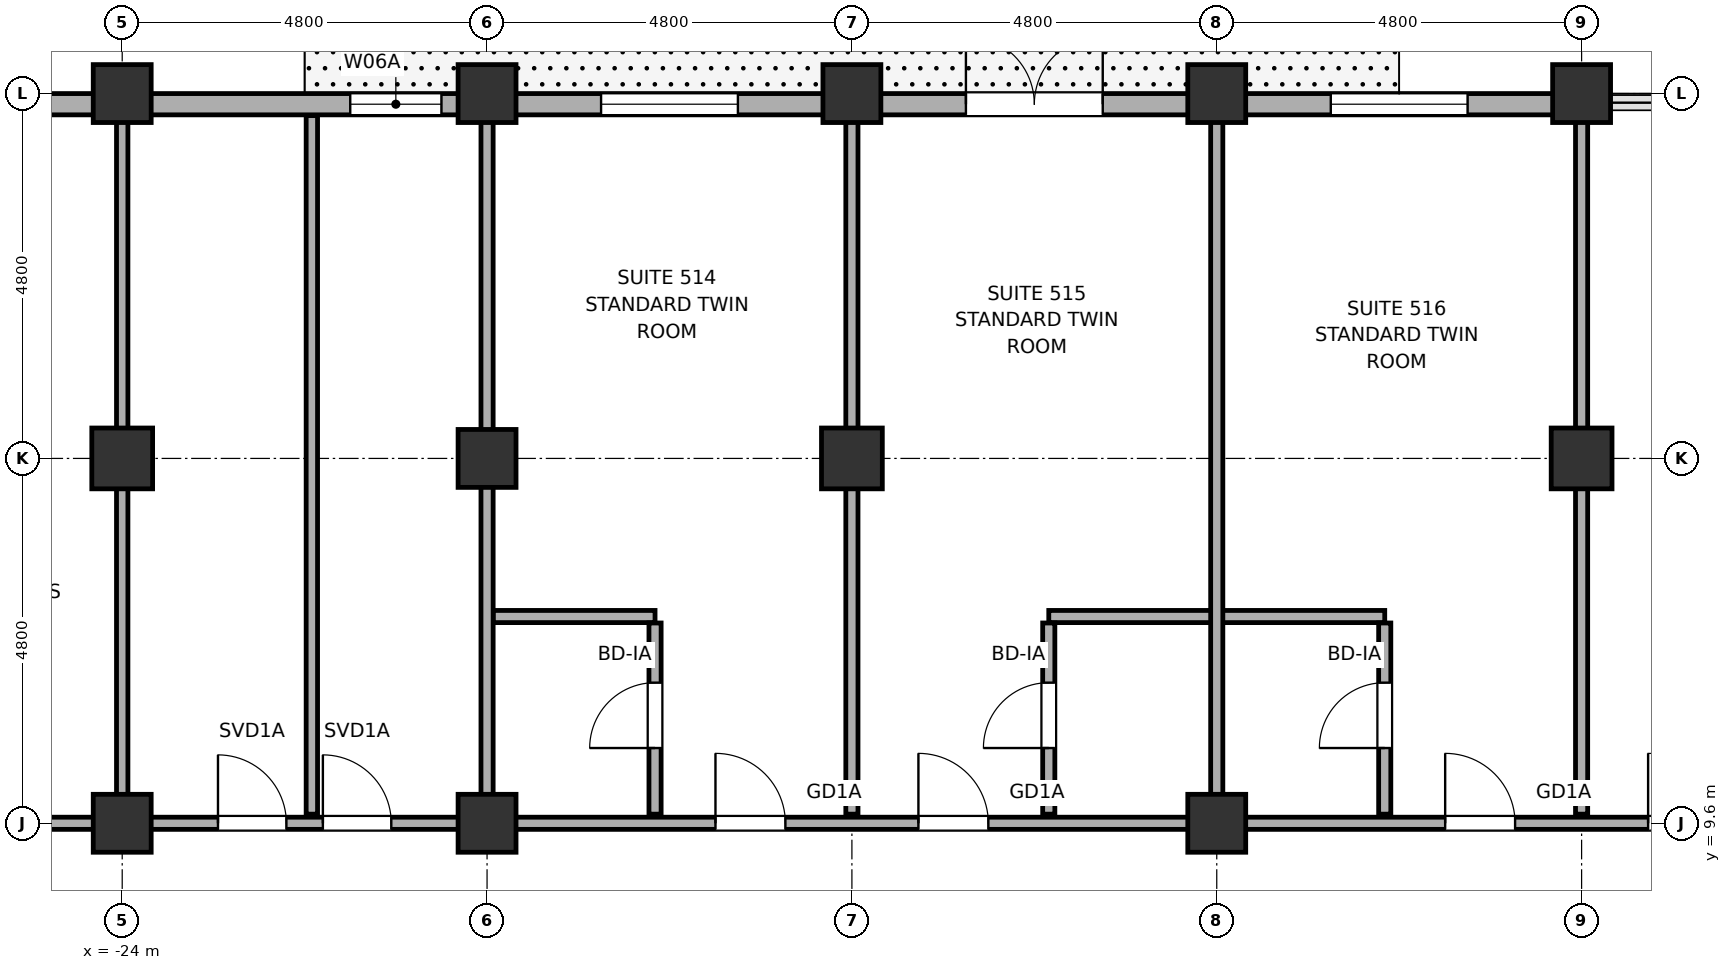
"""IFC4 building model, lengths in metres.
Left out: names, types, materials, properties, quantities, classifications, styles, units other than length and angle.
Written with IfcOpenShell. Run it as: python <this file> out.ifc"""

import sys

from ifc_helpers import new_model, si_unit, direction, frame, frame_2d, origin, origin_2d, place, context, subcontext, project, spatial, rectangle, hollow_rectangle, hollow_circle, extrude, element, fill, save


model = new_model("IFC4")
c1 = context("Model", 3, precision=1e-05, world=origin(), true_north=direction((0.0, 1.0)))
c2 = subcontext(c1, "Body", "Model", "MODEL_VIEW")
j1 = project(units=[si_unit("LENGTHUNIT", "METRE"), si_unit("PLANEANGLEUNIT", "RADIAN")], contexts=[c1])
p1 = place(None, origin())
s1 = spatial("IfcSite", under=j1, at=p1, CompositionType="ELEMENT")
p2 = place(p1, origin())
s2 = spatial("IfcBuilding", under=s1, at=p2, CompositionType="ELEMENT")
p3 = place(p2, frame((0.0, 0.0, 30.0)))
s3 = spatial("IfcBuildingStorey", under=s2, at=p3, CompositionType="ELEMENT", Elevation=30.0)
p4 = place(p3, frame((-24.0, 9.6, 0.0), z_axis=(0.0, 0.0, 1.0), x_axis=(1.0, 0.0, 0.0)))
e1 = element("IfcColumn", 1, at=p4, inside=s3, PredefinedType="COLUMN", context=c2, shape_type="SweptSolid", body=[
    extrude(hollow_circle(Radius=0.381, WallThickness=0.032, at=origin_2d()), origin(), (0.0, 0.0, 1.0), 3.7),
])
p5 = place(p3, frame((-24.0, 14.4, 0.0), z_axis=(0.0, 0.0, 1.0), x_axis=(1.0, 0.0, 0.0)))
e2 = element("IfcColumn", 2, at=p5, inside=s3, PredefinedType="COLUMN", context=c2, shape_type="SweptSolid", body=[
    extrude(hollow_rectangle(XDim=0.8, YDim=0.8, WallThickness=0.036, at=origin_2d()), origin(), (0.0, 0.0, 1.0), 3.7),
])
for number, where, z_axis, x_axis in (
    (3, (-24.0, 19.2, 0.0), (0.0, 0.0, 1.0), (1.0, 0.0, 0.0)),
    (4, (-19.2, 9.6, 0.0), (0.0, 0.0, 1.0), (1.0, 0.0, 0.0)),
    (5, (-19.2, 14.4, 0.0), (0.0, 0.0, 1.0), (1.0, 0.0, 0.0)),
    (6, (-19.2, 19.2, 0.0), (0.0, 0.0, 1.0), (1.0, 0.0, 0.0)),
):
    element("IfcColumn", number, at=place(p3, frame(where, z_axis=z_axis, x_axis=x_axis)), inside=s3, PredefinedType="COLUMN", context=c2, shape_type="SweptSolid", body=[
        extrude(hollow_circle(Radius=0.381, WallThickness=0.032, at=origin_2d()), origin(), (0.0, 0.0, 1.0), 3.7),
    ])
p6 = place(p3, frame((-14.4, 14.4, 0.0), z_axis=(0.0, 0.0, 1.0), x_axis=(1.0, 0.0, 0.0)))
e7 = element("IfcColumn", 7, at=p6, inside=s3, PredefinedType="COLUMN", context=c2, shape_type="SweptSolid", body=[
    extrude(hollow_rectangle(XDim=0.8, YDim=0.8, WallThickness=0.036, at=origin_2d()), origin(), (0.0, 0.0, 1.0), 3.7),
])
for number, where, z_axis, x_axis in (
    (8, (-14.4, 19.2, 0.0), (0.0, 0.0, 1.0), (1.0, 0.0, 0.0)),
    (9, (-9.6, 9.6, 0.0), (0.0, 0.0, 1.0), (1.0, 0.0, 0.0)),
    (10, (-9.6, 19.2, 0.0), (0.0, 0.0, 1.0), (1.0, 0.0, 0.0)),
):
    element("IfcColumn", number, at=place(p3, frame(where, z_axis=z_axis, x_axis=x_axis)), inside=s3, PredefinedType="COLUMN", context=c2, shape_type="SweptSolid", body=[
        extrude(hollow_circle(Radius=0.381, WallThickness=0.032, at=origin_2d()), origin(), (0.0, 0.0, 1.0), 3.7),
    ])
p7 = place(p3, frame((-4.8, 14.4, 0.0), z_axis=(0.0, 0.0, 1.0), x_axis=(1.0, 0.0, 0.0)))
e11 = element("IfcColumn", 11, at=p7, inside=s3, PredefinedType="COLUMN", context=c2, shape_type="SweptSolid", body=[
    extrude(hollow_rectangle(XDim=0.8, YDim=0.8, WallThickness=0.036, at=origin_2d()), origin(), (0.0, 0.0, 1.0), 3.7),
])
p8 = place(p3, frame((-4.8, 19.2, 0.0), z_axis=(0.0, 0.0, 1.0), x_axis=(1.0, 0.0, 0.0)))
e12 = element("IfcColumn", 12, at=p8, inside=s3, PredefinedType="COLUMN", context=c2, shape_type="SweptSolid", body=[
    extrude(hollow_circle(Radius=0.381, WallThickness=0.032, at=origin_2d()), origin(), (0.0, 0.0, 1.0), 3.7),
])
p9 = place(p3, frame((-30.0, 19.06, 0.0), z_axis=(0.0, 0.0, 1.0), x_axis=(1.0, 0.0, 0.0)))
e13 = element("IfcWall", 13, at=p9, inside=s3, PredefinedType="SOLIDWALL", context=c2, shape_type="SweptSolid", body=[
    extrude(rectangle(XDim=25.25, YDim=0.28, at=frame_2d((12.625, 0.0))), origin(), (0.0, 0.0, 1.0), 2.12),
])
p10 = place(p9, frame((17.1, 0.0, 0.0)))
e14 = element("IfcOpeningElement", 14, at=p10, cuts=e13, PredefinedType="OPENING", context=c2, shape_type="SweptSolid", body=[
    extrude(rectangle(XDim=1.8, YDim=2.02, at=frame_2d((0.9, 1.01))), frame((0.0, 0.155, 0.0), z_axis=(0.0, -1.0, 0.0), x_axis=(1.0, 0.0, 0.0)), (0.0, 0.0, 1.0), 0.31),
])
p11 = place(p9, frame((9.0, 0.0, 0.75)))
e15 = element("IfcOpeningElement", 15, at=p11, cuts=e13, PredefinedType="OPENING", context=c2, shape_type="SweptSolid", body=[
    extrude(rectangle(XDim=1.2, YDim=1.15, at=frame_2d((0.6, 0.575))), frame((0.0, 0.155, 0.0), z_axis=(0.0, -1.0, 0.0), x_axis=(1.0, 0.0, 0.0)), (0.0, 0.0, 1.0), 0.31),
])
p12 = place(p9, frame((12.3, 0.0, 0.75)))
e16 = element("IfcOpeningElement", 16, at=p12, cuts=e13, PredefinedType="OPENING", context=c2, shape_type="SweptSolid", body=[
    extrude(rectangle(XDim=1.8, YDim=1.15, at=frame_2d((0.9, 0.575))), frame((0.0, 0.155, 0.0), z_axis=(0.0, -1.0, 0.0), x_axis=(1.0, 0.0, 0.0)), (0.0, 0.0, 1.0), 0.31),
])
p13 = place(p9, frame((21.9, 0.0, 0.75)))
e17 = element("IfcOpeningElement", 17, at=p13, cuts=e13, PredefinedType="OPENING", context=c2, shape_type="SweptSolid", body=[
    extrude(rectangle(XDim=1.8, YDim=1.15, at=frame_2d((0.9, 0.575))), frame((0.0, 0.155, 0.0), z_axis=(0.0, -1.0, 0.0), x_axis=(1.0, 0.0, 0.0)), (0.0, 0.0, 1.0), 0.31),
])
p14 = place(p3, frame((-33.43, 9.6, 0.0), z_axis=(0.0, 0.0, 1.0), x_axis=(1.0, 0.0, 0.0)))
e18 = element("IfcWall", 18, at=p14, inside=s3, PredefinedType="PARTITIONING", context=c2, shape_type="SweptSolid", body=[
    extrude(rectangle(XDim=62.06, YDim=0.16, at=frame_2d((31.03, 0.0))), origin(), (0.0, 0.0, 1.0), 2.12),
])
p15 = place(p14, frame((6.8, 0.0, 0.0)))
e19 = element("IfcOpeningElement", 19, at=p15, cuts=e18, PredefinedType="OPENING", context=c2, shape_type="SweptSolid", body=[
    extrude(rectangle(XDim=0.9, YDim=2.02, at=frame_2d((0.45, 1.01))), frame((0.0, 0.095, 0.0), z_axis=(0.0, -1.0, 0.0), x_axis=(1.0, 0.0, 0.0)), (0.0, 0.0, 1.0), 0.19),
])
p16 = place(p14, frame((54.361, 0.0, 0.0)))
e20 = element("IfcOpeningElement", 20, at=p16, cuts=e18, PredefinedType="OPENING", context=c2, shape_type="SweptSolid", body=[
    extrude(rectangle(XDim=0.9, YDim=2.02, at=frame_2d((0.45, 1.01))), frame((0.0, 0.095, 0.0), z_axis=(0.0, -1.0, 0.0), x_axis=(1.0, 0.0, 0.0)), (0.0, 0.0, 1.0), 0.19),
])
p17 = place(p14, frame((10.69, 0.0, 0.0)))
e21 = element("IfcOpeningElement", 21, at=p17, cuts=e18, PredefinedType="OPENING", context=c2, shape_type="SweptSolid", body=[
    extrude(rectangle(XDim=0.9, YDim=2.02, at=frame_2d((0.45, 1.01))), frame((0.0, 0.095, 0.0), z_axis=(0.0, -1.0, 0.0), x_axis=(1.0, 0.0, 0.0)), (0.0, 0.0, 1.0), 0.19),
])
p18 = place(p14, frame((12.07, 0.0, 0.0)))
e22 = element("IfcOpeningElement", 22, at=p18, cuts=e18, PredefinedType="OPENING", context=c2, shape_type="SweptSolid", body=[
    extrude(rectangle(XDim=0.9, YDim=2.02, at=frame_2d((0.45, 1.01))), frame((0.0, 0.095, 0.0), z_axis=(0.0, -1.0, 0.0), x_axis=(1.0, 0.0, 0.0)), (0.0, 0.0, 1.0), 0.19),
])
p19 = place(p14, frame((17.235, 0.0, 0.0)))
e23 = element("IfcOpeningElement", 23, at=p19, cuts=e18, PredefinedType="OPENING", context=c2, shape_type="SweptSolid", body=[
    extrude(rectangle(XDim=0.92, YDim=2.02, at=frame_2d((0.46, 1.01))), frame((0.0, 0.095, 0.0), z_axis=(0.0, -1.0, 0.0), x_axis=(1.0, 0.0, 0.0)), (0.0, 0.0, 1.0), 0.19),
])
p20 = place(p14, frame((19.905, 0.0, 0.0)))
e24 = element("IfcOpeningElement", 24, at=p20, cuts=e18, PredefinedType="OPENING", context=c2, shape_type="SweptSolid", body=[
    extrude(rectangle(XDim=0.92, YDim=2.02, at=frame_2d((0.46, 1.01))), frame((0.0, 0.095, 0.0), z_axis=(0.0, -1.0, 0.0), x_axis=(1.0, 0.0, 0.0)), (0.0, 0.0, 1.0), 0.19),
])
p21 = place(p14, frame((26.835, 0.0, 0.0)))
e25 = element("IfcOpeningElement", 25, at=p21, cuts=e18, PredefinedType="OPENING", context=c2, shape_type="SweptSolid", body=[
    extrude(rectangle(XDim=0.92, YDim=2.02, at=frame_2d((0.46, 1.01))), frame((0.0, 0.095, 0.0), z_axis=(0.0, -1.0, 0.0), x_axis=(1.0, 0.0, 0.0)), (0.0, 0.0, 1.0), 0.19),
])
p22 = place(p14, frame((29.505, 0.0, 0.0)))
e26 = element("IfcOpeningElement", 26, at=p22, cuts=e18, PredefinedType="OPENING", context=c2, shape_type="SweptSolid", body=[
    extrude(rectangle(XDim=0.92, YDim=2.02, at=frame_2d((0.46, 1.01))), frame((0.0, 0.095, 0.0), z_axis=(0.0, -1.0, 0.0), x_axis=(1.0, 0.0, 0.0)), (0.0, 0.0, 1.0), 0.19),
])
p23 = place(p14, frame((36.435, 0.0, 0.0)))
e27 = element("IfcOpeningElement", 27, at=p23, cuts=e18, PredefinedType="OPENING", context=c2, shape_type="SweptSolid", body=[
    extrude(rectangle(XDim=0.92, YDim=2.02, at=frame_2d((0.46, 1.01))), frame((0.0, 0.095, 0.0), z_axis=(0.0, -1.0, 0.0), x_axis=(1.0, 0.0, 0.0)), (0.0, 0.0, 1.0), 0.19),
])
p24 = place(p14, frame((39.105, 0.0, 0.0)))
e28 = element("IfcOpeningElement", 28, at=p24, cuts=e18, PredefinedType="OPENING", context=c2, shape_type="SweptSolid", body=[
    extrude(rectangle(XDim=0.92, YDim=2.02, at=frame_2d((0.46, 1.01))), frame((0.0, 0.095, 0.0), z_axis=(0.0, -1.0, 0.0), x_axis=(1.0, 0.0, 0.0)), (0.0, 0.0, 1.0), 0.19),
])
p25 = place(p14, frame((46.035, 0.0, 0.0)))
e29 = element("IfcOpeningElement", 29, at=p25, cuts=e18, PredefinedType="OPENING", context=c2, shape_type="SweptSolid", body=[
    extrude(rectangle(XDim=0.92, YDim=2.02, at=frame_2d((0.46, 1.01))), frame((0.0, 0.095, 0.0), z_axis=(0.0, -1.0, 0.0), x_axis=(1.0, 0.0, 0.0)), (0.0, 0.0, 1.0), 0.19),
])
p26 = place(p14, frame((48.705, 0.0, 0.0)))
e30 = element("IfcOpeningElement", 30, at=p26, cuts=e18, PredefinedType="OPENING", context=c2, shape_type="SweptSolid", body=[
    extrude(rectangle(XDim=0.92, YDim=2.02, at=frame_2d((0.46, 1.01))), frame((0.0, 0.095, 0.0), z_axis=(0.0, -1.0, 0.0), x_axis=(1.0, 0.0, 0.0)), (0.0, 0.0, 1.0), 0.19),
])
p27 = place(p3, frame((-19.12, 12.32, 0.0), z_axis=(0.0, 0.0, 1.0), x_axis=(1.0, 0.0, 0.0)))
e31 = element("IfcWall", 31, at=p27, inside=s3, PredefinedType="PARTITIONING", context=c2, shape_type="SweptSolid", body=[
    extrude(rectangle(XDim=2.13, YDim=0.16, at=frame_2d((1.065, 0.0))), origin(), (0.0, 0.0, 1.0), 2.82),
])
p28 = place(p3, frame((-11.81, 12.32, 0.0), z_axis=(0.0, 0.0, 1.0), x_axis=(1.0, 0.0, 0.0)))
e32 = element("IfcWall", 32, at=p28, inside=s3, PredefinedType="PARTITIONING", context=c2, shape_type="SweptSolid", body=[
    extrude(rectangle(XDim=4.42, YDim=0.16, at=frame_2d((2.21, 0.0))), origin(), (0.0, 0.0, 1.0), 3.02),
])
for number, where, z_axis, x_axis in (
    (33, (-24.0, 9.72, 0.0), (0.0, 0.0, 1.0), (0.0, 1.0, 0.0)),
    (34, (-21.505, 9.72, 0.0), (0.0, 0.0, 1.0), (0.0, 1.0, 0.0)),
):
    element("IfcWall", number, at=place(p3, frame(where, z_axis=z_axis, x_axis=x_axis)), inside=s3, PredefinedType="PARTITIONING", context=c2, shape_type="SweptSolid", body=[
        extrude(rectangle(XDim=9.19, YDim=0.15, at=frame_2d((4.595, 0.0))), origin(), (0.0, 0.0, 1.0), 2.12),
    ])
p29 = place(p3, frame((-19.2, 9.72, 0.0), z_axis=(0.0, 0.0, 1.0), x_axis=(0.0, 1.0, 0.0)))
e35 = element("IfcWall", 35, at=p29, inside=s3, PredefinedType="PARTITIONING", context=c2, shape_type="SweptSolid", body=[
    extrude(rectangle(XDim=9.19, YDim=0.16, at=frame_2d((4.595, 0.0))), origin(), (0.0, 0.0, 1.0), 2.12),
])
p30 = place(p3, frame((-16.99, 9.72, 0.0), z_axis=(0.0, 0.0, 1.0), x_axis=(0.0, 1.0, 0.0)))
e36 = element("IfcWall", 36, at=p30, inside=s3, PredefinedType="PARTITIONING", context=c2, shape_type="SweptSolid", body=[
    extrude(rectangle(XDim=2.515, YDim=0.16, at=frame_2d((1.258, 0.0))), origin(), (0.0, 0.0, 1.0), 2.12),
])
p31 = place(p30, frame((0.87, 0.0, 0.0)))
e37 = element("IfcOpeningElement", 37, at=p31, cuts=e36, PredefinedType="OPENING", context=c2, shape_type="SweptSolid", body=[
    extrude(rectangle(XDim=0.86, YDim=2.02, at=frame_2d((0.43, 1.01))), frame((0.0, 0.095, 0.0), z_axis=(0.0, -1.0, 0.0), x_axis=(1.0, 0.0, 0.0)), (0.0, 0.0, 1.0), 0.19),
])
p32 = place(p3, frame((-14.4, 9.72, 0.0), z_axis=(0.0, 0.0, 1.0), x_axis=(0.0, 1.0, 0.0)))
e38 = element("IfcWall", 38, at=p32, inside=s3, PredefinedType="PARTITIONING", context=c2, shape_type="SweptSolid", body=[
    extrude(rectangle(XDim=9.19, YDim=0.16, at=frame_2d((4.595, 0.0))), origin(), (0.0, 0.0, 1.0), 2.12),
])
p33 = place(p3, frame((-11.81, 9.72, 0.0), z_axis=(0.0, 0.0, 1.0), x_axis=(0.0, 1.0, 0.0)))
e39 = element("IfcWall", 39, at=p33, inside=s3, PredefinedType="PARTITIONING", context=c2, shape_type="SweptSolid", body=[
    extrude(rectangle(XDim=2.515, YDim=0.16, at=frame_2d((1.258, 0.0))), origin(), (0.0, 0.0, 1.0), 2.12),
])
p34 = place(p33, frame((0.87, 0.0, 0.0)))
e40 = element("IfcOpeningElement", 40, at=p34, cuts=e39, PredefinedType="OPENING", context=c2, shape_type="SweptSolid", body=[
    extrude(rectangle(XDim=0.86, YDim=2.02, at=frame_2d((0.43, 1.01))), frame((0.0, 0.095, 0.0), z_axis=(0.0, -1.0, 0.0), x_axis=(1.0, 0.0, 0.0)), (0.0, 0.0, 1.0), 0.19),
])
p35 = place(p3, frame((-9.6, 9.72, 0.0), z_axis=(0.0, 0.0, 1.0), x_axis=(0.0, 1.0, 0.0)))
e41 = element("IfcWall", 41, at=p35, inside=s3, PredefinedType="PARTITIONING", context=c2, shape_type="SweptSolid", body=[
    extrude(rectangle(XDim=9.19, YDim=0.16, at=frame_2d((4.595, 0.0))), origin(), (0.0, 0.0, 1.0), 2.12),
])
p36 = place(p3, frame((-7.39, 9.72, 0.0), z_axis=(0.0, 0.0, 1.0), x_axis=(0.0, 1.0, 0.0)))
e42 = element("IfcWall", 42, at=p36, inside=s3, PredefinedType="PARTITIONING", context=c2, shape_type="SweptSolid", body=[
    extrude(rectangle(XDim=2.515, YDim=0.16, at=frame_2d((1.258, 0.0))), origin(), (0.0, 0.0, 1.0), 2.12),
])
p37 = place(p36, frame((0.87, 0.0, 0.0)))
e43 = element("IfcOpeningElement", 43, at=p37, cuts=e42, PredefinedType="OPENING", context=c2, shape_type="SweptSolid", body=[
    extrude(rectangle(XDim=0.86, YDim=2.02, at=frame_2d((0.43, 1.01))), frame((0.0, 0.095, 0.0), z_axis=(0.0, -1.0, 0.0), x_axis=(1.0, 0.0, 0.0)), (0.0, 0.0, 1.0), 0.19),
])
p38 = place(p3, frame((-4.8, 9.72, 0.0), z_axis=(0.0, 0.0, 1.0), x_axis=(0.0, 1.0, 0.0)))
e44 = element("IfcWall", 44, at=p38, inside=s3, PredefinedType="PARTITIONING", context=c2, shape_type="SweptSolid", body=[
    extrude(rectangle(XDim=9.19, YDim=0.16, at=frame_2d((4.595, 0.0))), origin(), (0.0, 0.0, 1.0), 2.12),
])
p39 = place(p10, origin())
e45 = element("IfcDoor", 45, at=p39, inside=s3, OperationType="DOUBLE_DOOR_SINGLE_SWING", PredefinedType="DOOR", context=c2, shape_type="SweptSolid", body=[
    extrude(rectangle(XDim=1.8, YDim=2.02, at=frame_2d((0.9, 1.01))), frame((0.0, 0.025, 0.0), z_axis=(0.0, -1.0, 0.0), x_axis=(1.0, 0.0, 0.0)), (0.0, 0.0, 1.0), 0.05),
])
fill(e14, e45)
p40 = place(p11, origin())
e46 = element("IfcWindow", 46, at=p40, inside=s3, PartitioningType="SINGLE_PANEL", PredefinedType="WINDOW", context=c2, shape_type="SweptSolid", body=[
    extrude(rectangle(XDim=1.2, YDim=1.15, at=frame_2d((0.6, 0.575))), frame((0.0, 0.03, 0.0), z_axis=(0.0, -1.0, 0.0), x_axis=(1.0, 0.0, 0.0)), (0.0, 0.0, 1.0), 0.06),
])
fill(e15, e46)
p41 = place(p12, origin())
e47 = element("IfcWindow", 47, at=p41, inside=s3, PartitioningType="SINGLE_PANEL", PredefinedType="WINDOW", context=c2, shape_type="SweptSolid", body=[
    extrude(rectangle(XDim=1.8, YDim=1.15, at=frame_2d((0.9, 0.575))), frame((0.0, 0.03, 0.0), z_axis=(0.0, -1.0, 0.0), x_axis=(1.0, 0.0, 0.0)), (0.0, 0.0, 1.0), 0.06),
])
fill(e16, e47)
p42 = place(p13, origin())
e48 = element("IfcWindow", 48, at=p42, inside=s3, PartitioningType="SINGLE_PANEL", PredefinedType="WINDOW", context=c2, shape_type="SweptSolid", body=[
    extrude(rectangle(XDim=1.8, YDim=1.15, at=frame_2d((0.9, 0.575))), frame((0.0, 0.03, 0.0), z_axis=(0.0, -1.0, 0.0), x_axis=(1.0, 0.0, 0.0)), (0.0, 0.0, 1.0), 0.06),
])
fill(e17, e48)
p43 = place(p17, origin())
e49 = element("IfcDoor", 49, at=p43, inside=s3, OperationType="SINGLE_SWING_RIGHT", PredefinedType="DOOR", context=c2, shape_type="SweptSolid", body=[
    extrude(rectangle(XDim=0.9, YDim=2.02, at=frame_2d((0.45, 1.01))), frame((0.0, 0.025, 0.0), z_axis=(0.0, -1.0, 0.0), x_axis=(1.0, 0.0, 0.0)), (0.0, 0.0, 1.0), 0.05),
])
fill(e21, e49)
p44 = place(p18, origin())
e50 = element("IfcDoor", 50, at=p44, inside=s3, OperationType="SINGLE_SWING_LEFT", PredefinedType="DOOR", context=c2, shape_type="SweptSolid", body=[
    extrude(rectangle(XDim=0.9, YDim=2.02, at=frame_2d((0.45, 1.01))), frame((0.0, 0.025, 0.0), z_axis=(0.0, -1.0, 0.0), x_axis=(1.0, 0.0, 0.0)), (0.0, 0.0, 1.0), 0.05),
])
fill(e22, e50)
p45 = place(p19, origin())
e51 = element("IfcDoor", 51, at=p45, inside=s3, OperationType="SINGLE_SWING_RIGHT", PredefinedType="DOOR", context=c2, shape_type="SweptSolid", body=[
    extrude(rectangle(XDim=0.92, YDim=2.02, at=frame_2d((0.46, 1.01))), frame((0.0, 0.025, 0.0), z_axis=(0.0, -1.0, 0.0), x_axis=(1.0, 0.0, 0.0)), (0.0, 0.0, 1.0), 0.05),
])
fill(e23, e51)
p46 = place(p31, origin())
e52 = element("IfcDoor", 52, at=p46, inside=s3, OperationType="SINGLE_SWING_RIGHT", PredefinedType="DOOR", context=c2, shape_type="SweptSolid", body=[
    extrude(rectangle(XDim=0.86, YDim=2.02, at=frame_2d((0.43, 1.01))), frame((0.0, 0.025, 0.0), z_axis=(0.0, -1.0, 0.0), x_axis=(1.0, 0.0, 0.0)), (0.0, 0.0, 1.0), 0.05),
])
fill(e37, e52)
p47 = place(p20, origin())
e53 = element("IfcDoor", 53, at=p47, inside=s3, OperationType="SINGLE_SWING_LEFT", PredefinedType="DOOR", context=c2, shape_type="SweptSolid", body=[
    extrude(rectangle(XDim=0.92, YDim=2.02, at=frame_2d((0.46, 1.01))), frame((0.0, 0.025, 0.0), z_axis=(0.0, -1.0, 0.0), x_axis=(1.0, 0.0, 0.0)), (0.0, 0.0, 1.0), 0.05),
])
fill(e24, e53)
p48 = place(p34, origin())
e54 = element("IfcDoor", 54, at=p48, inside=s3, OperationType="SINGLE_SWING_RIGHT", PredefinedType="DOOR", context=c2, shape_type="SweptSolid", body=[
    extrude(rectangle(XDim=0.86, YDim=2.02, at=frame_2d((0.43, 1.01))), frame((0.0, 0.025, 0.0), z_axis=(0.0, -1.0, 0.0), x_axis=(1.0, 0.0, 0.0)), (0.0, 0.0, 1.0), 0.05),
])
fill(e40, e54)
p49 = place(p21, origin())
e55 = element("IfcDoor", 55, at=p49, inside=s3, OperationType="SINGLE_SWING_LEFT", PredefinedType="DOOR", context=c2, shape_type="SweptSolid", body=[
    extrude(rectangle(XDim=0.92, YDim=2.02, at=frame_2d((0.46, 1.01))), frame((0.0, 0.025, 0.0), z_axis=(0.0, -1.0, 0.0), x_axis=(1.0, 0.0, 0.0)), (0.0, 0.0, 1.0), 0.05),
])
fill(e25, e55)
p50 = place(p37, origin())
e56 = element("IfcDoor", 56, at=p50, inside=s3, OperationType="SINGLE_SWING_LEFT", PredefinedType="DOOR", context=c2, shape_type="SweptSolid", body=[
    extrude(rectangle(XDim=0.86, YDim=2.02, at=frame_2d((0.43, 1.01))), frame((0.0, 0.025, 0.0), z_axis=(0.0, -1.0, 0.0), x_axis=(1.0, 0.0, 0.0)), (0.0, 0.0, 1.0), 0.05),
])
fill(e43, e56)
p51 = place(p22, origin())
e57 = element("IfcDoor", 57, at=p51, inside=s3, OperationType="SINGLE_SWING_RIGHT", PredefinedType="DOOR", context=c2, shape_type="SweptSolid", body=[
    extrude(rectangle(XDim=0.92, YDim=2.02, at=frame_2d((0.46, 1.01))), frame((0.0, 0.025, 0.0), z_axis=(0.0, -1.0, 0.0), x_axis=(1.0, 0.0, 0.0)), (0.0, 0.0, 1.0), 0.05),
])
fill(e26, e57)
save(model, sys.argv[1])
